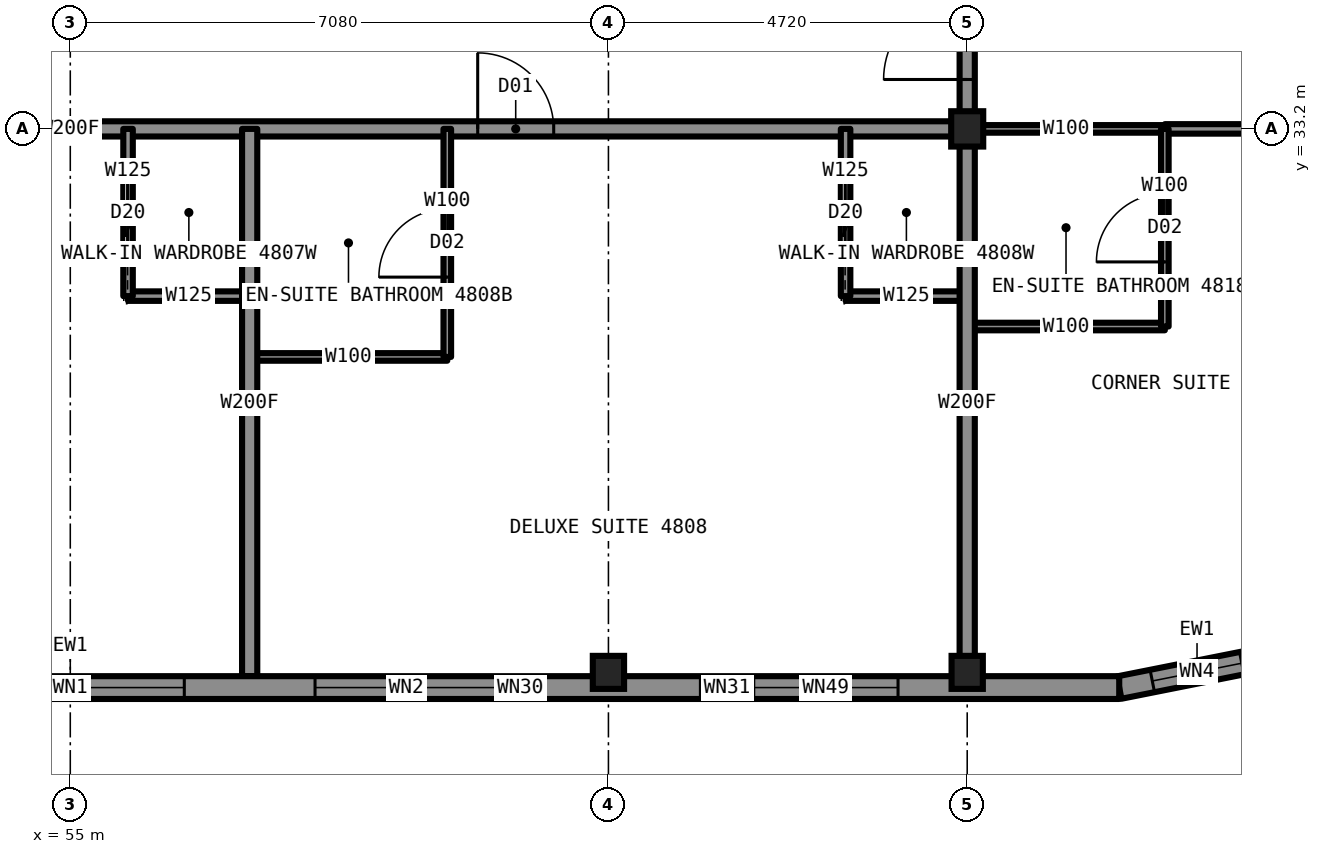
"""IFC4 building model, lengths in metres.
Left out: names, types, materials, properties, quantities, classifications, styles, units other than length and angle.
Written with IfcOpenShell. Run it as: python <this file> out.ifc"""

import sys

from ifc_helpers import new_model, si_unit, direction, frame, frame_2d, origin, origin_2d, place, context, subcontext, project, spatial, rectangle, i_section, extrude, element, fill, save


model = new_model("IFC4")
c1 = context("Model", 3, precision=1e-05, world=origin(), true_north=direction((0.0, 1.0)))
c2 = subcontext(c1, "Body", "Model", "MODEL_VIEW")
j1 = project(units=[si_unit("LENGTHUNIT", "METRE"), si_unit("PLANEANGLEUNIT", "RADIAN")], contexts=[c1])
p1 = place(None, origin())
s1 = spatial("IfcSite", under=j1, at=p1, CompositionType="ELEMENT")
p2 = place(p1, origin())
s2 = spatial("IfcBuilding", under=s1, at=p2, CompositionType="ELEMENT")
p3 = place(p2, frame((0.0, 0.0, 172.3)))
s3 = spatial("IfcBuildingStorey", under=s2, at=p3, CompositionType="ELEMENT", Elevation=172.3)
for number, where, z_axis, x_axis in (
    (1, (62.08, 26.05, 0.0), (0.0, 0.0, 1.0), (1.0, 0.0, 0.0)),
    (2, (66.8, 26.05, 0.0), (0.0, 0.0, 1.0), (1.0, 0.0, 0.0)),
):
    element("IfcColumn", number, at=place(p3, frame(where, z_axis=z_axis, x_axis=x_axis)), inside=s3, PredefinedType="COLUMN", context=c2, shape_type="SweptSolid", body=[
        extrude(i_section(OverallWidth=0.411, OverallDepth=0.434, WebThickness=0.036, FlangeThickness=0.057, at=origin_2d()), origin(), (0.0, 0.0, 1.0), 3.5),
    ])
p4 = place(p3, frame((66.8, 33.2, 0.0), z_axis=(0.0, 0.0, 1.0), x_axis=(1.0, 0.0, 0.0)))
e3 = element("IfcColumn", 3, at=p4, inside=s3, PredefinedType="COLUMN", context=c2, shape_type="SweptSolid", body=[
    extrude(i_section(OverallWidth=0.422, OverallDepth=0.465, WebThickness=0.045, FlangeThickness=0.073, at=origin_2d()), origin(), (0.0, 0.0, 1.0), 3.5),
])
p5 = place(p3, frame((66.8, 33.2, 0.0), z_axis=(0.0, 0.0, 1.0), x_axis=(1.0, 0.0, 0.0)))
e4 = element("IfcWall", 4, at=p5, inside=s3, PredefinedType="PARTITIONING", context=c2, shape_type="SweptSolid", body=[
    extrude(rectangle(XDim=2.6, YDim=0.1, at=frame_2d((1.3, 0.0))), origin(), (0.0, 0.0, 1.0), 2.573),
])
p6 = place(p3, frame((43.2, 33.2, 0.0), z_axis=(0.0, 0.0, 1.0), x_axis=(1.0, 0.0, 0.0)))
e5 = element("IfcWall", 5, at=p6, inside=s3, PredefinedType="PARTITIONING", context=c2, shape_type="SweptSolid", body=[
    extrude(rectangle(XDim=23.6, YDim=0.2, at=frame_2d((11.8, 0.0))), origin(), (0.0, 0.0, 1.0), 3.33),
])
p7 = place(p6, frame((1.46, 0.0, 0.0)))
e6 = element("IfcOpeningElement", 6, at=p7, cuts=e5, PredefinedType="OPENING", context=c2, shape_type="SweptSolid", body=[
    extrude(rectangle(XDim=1.0, YDim=2.2, at=frame_2d((0.5, 1.1))), frame((0.0, 0.11, 0.0), z_axis=(0.0, -1.0, 0.0), x_axis=(1.0, 0.0, 0.0)), (0.0, 0.0, 1.0), 0.22),
])
p8 = place(p6, frame((7.72, 0.0, 0.0)))
e7 = element("IfcOpeningElement", 7, at=p8, cuts=e5, PredefinedType="OPENING", context=c2, shape_type="SweptSolid", body=[
    extrude(rectangle(XDim=1.0, YDim=2.2, at=frame_2d((0.5, 1.1))), frame((0.0, 0.11, 0.0), z_axis=(0.0, -1.0, 0.0), x_axis=(1.0, 0.0, 0.0)), (0.0, 0.0, 1.0), 0.22),
])
p9 = place(p6, frame((17.16, 0.0, 0.0)))
e8 = element("IfcOpeningElement", 8, at=p9, cuts=e5, PredefinedType="OPENING", context=c2, shape_type="SweptSolid", body=[
    extrude(rectangle(XDim=1.0, YDim=2.2, at=frame_2d((0.5, 1.1))), frame((0.0, 0.11, 0.0), z_axis=(0.0, -1.0, 0.0), x_axis=(1.0, 0.0, 0.0)), (0.0, 0.0, 1.0), 0.22),
])
p10 = place(p3, frame((69.4, 33.2, 0.0), z_axis=(0.0, 0.0, 1.0), x_axis=(1.0, 0.0, 0.0)))
e9 = element("IfcWall", 9, at=p10, inside=s3, PredefinedType="PARTITIONING", context=c2, shape_type="SweptSolid", body=[
    extrude(rectangle(XDim=4.6, YDim=0.125, at=frame_2d((2.3, 0.0))), origin(), (0.0, 0.0, 1.0), 2.573),
])
p11 = place(p10, frame((1.15, 0.0, 0.0)))
e10 = element("IfcOpeningElement", 10, at=p11, cuts=e9, PredefinedType="OPENING", context=c2, shape_type="SweptSolid", body=[
    extrude(rectangle(XDim=0.9, YDim=2.2, at=frame_2d((0.45, 1.1))), frame((0.0, 0.073, 0.0), z_axis=(0.0, -1.0, 0.0), x_axis=(1.0, 0.0, 0.0)), (0.0, 0.0, 1.0), 0.145),
])
for number, where, z_axis, x_axis in (
    (11, (55.76, 31.0, 0.0), (0.0, 0.0, 1.0), (1.0, 0.0, 0.0)),
    (12, (65.2, 31.0, 0.0), (0.0, 0.0, 1.0), (1.0, 0.0, 0.0)),
):
    element("IfcWall", number, at=place(p3, frame(where, z_axis=z_axis, x_axis=x_axis)), inside=s3, PredefinedType="PARTITIONING", context=c2, shape_type="SweptSolid", body=[
        extrude(rectangle(XDim=1.6, YDim=0.125, at=frame_2d((0.8, 0.0))), origin(), (0.0, 0.0, 1.0), 3.33),
    ])
for number, where, z_axis, x_axis in (
    (13, (66.8, 30.6, 0.0), (0.0, 0.0, 1.0), (1.0, 0.0, 0.0)),
    (14, (57.36, 30.2, 0.0), (0.0, 0.0, 1.0), (1.0, 0.0, 0.0)),
):
    element("IfcWall", number, at=place(p3, frame(where, z_axis=z_axis, x_axis=x_axis)), inside=s3, PredefinedType="PARTITIONING", context=c2, shape_type="SweptSolid", body=[
        extrude(rectangle(XDim=2.6, YDim=0.1, at=frame_2d((1.3, 0.0))), origin(), (0.0, 0.0, 1.0), 3.33),
    ])
p12 = place(p3, frame((55.76, 31.0, 0.0), z_axis=(0.0, 0.0, 1.0), x_axis=(0.0, 1.0, 0.0)))
e15 = element("IfcWall", 15, at=p12, inside=s3, PredefinedType="PARTITIONING", context=c2, shape_type="SweptSolid", body=[
    extrude(rectangle(XDim=2.2, YDim=0.125, at=frame_2d((1.1, 0.0))), origin(), (0.0, 0.0, 1.0), 3.33),
])
p13 = place(p12, frame((0.7, 0.0, 0.0)))
e16 = element("IfcOpeningElement", 16, at=p13, cuts=e15, PredefinedType="OPENING", context=c2, shape_type="SweptSolid", body=[
    extrude(rectangle(XDim=0.8, YDim=2.1, at=frame_2d((0.4, 1.05))), frame((0.0, 0.073, 0.0), z_axis=(0.0, -1.0, 0.0), x_axis=(1.0, 0.0, 0.0)), (0.0, 0.0, 1.0), 0.145),
])
p14 = place(p3, frame((65.2, 31.0, 0.0), z_axis=(0.0, 0.0, 1.0), x_axis=(0.0, 1.0, 0.0)))
e17 = element("IfcWall", 17, at=p14, inside=s3, PredefinedType="PARTITIONING", context=c2, shape_type="SweptSolid", body=[
    extrude(rectangle(XDim=2.2, YDim=0.125, at=frame_2d((1.1, 0.0))), origin(), (0.0, 0.0, 1.0), 3.33),
])
p15 = place(p14, frame((0.7, 0.0, 0.0)))
e18 = element("IfcOpeningElement", 18, at=p15, cuts=e17, PredefinedType="OPENING", context=c2, shape_type="SweptSolid", body=[
    extrude(rectangle(XDim=0.8, YDim=2.1, at=frame_2d((0.4, 1.05))), frame((0.0, 0.073, 0.0), z_axis=(0.0, -1.0, 0.0), x_axis=(1.0, 0.0, 0.0)), (0.0, 0.0, 1.0), 0.145),
])
p16 = place(p3, frame((66.8, 33.2, 0.0), z_axis=(0.0, 0.0, 1.0), x_axis=(0.0, 1.0, 0.0)))
e19 = element("IfcWall", 19, at=p16, inside=s3, PredefinedType="PARTITIONING", context=c2, shape_type="SweptSolid", body=[
    extrude(rectangle(XDim=23.58, YDim=0.2, at=frame_2d((11.79, 0.0))), origin(), (0.0, 0.0, 1.0), 3.33),
])
p17 = place(p16, frame((7.87, 0.0, 0.0)))
e20 = element("IfcOpeningElement", 20, at=p17, cuts=e19, PredefinedType="OPENING", context=c2, shape_type="SweptSolid", body=[
    extrude(rectangle(XDim=1.0, YDim=2.2, at=frame_2d((0.5, 1.1))), frame((0.0, 0.11, 0.0), z_axis=(0.0, -1.0, 0.0), x_axis=(1.0, 0.0, 0.0)), (0.0, 0.0, 1.0), 0.22),
])
p18 = place(p16, frame((10.9, 0.0, 0.0)))
e21 = element("IfcOpeningElement", 21, at=p18, cuts=e19, PredefinedType="OPENING", context=c2, shape_type="SweptSolid", body=[
    extrude(rectangle(XDim=1.0, YDim=2.2, at=frame_2d((0.5, 1.1))), frame((0.0, 0.11, 0.0), z_axis=(0.0, -1.0, 0.0), x_axis=(1.0, 0.0, 0.0)), (0.0, 0.0, 1.0), 0.22),
])
p19 = place(p16, frame((16.42, 0.0, 0.0)))
e22 = element("IfcOpeningElement", 22, at=p19, cuts=e19, PredefinedType="OPENING", context=c2, shape_type="SweptSolid", body=[
    extrude(rectangle(XDim=1.0, YDim=2.2, at=frame_2d((0.5, 1.1))), frame((0.0, 0.11, 0.0), z_axis=(0.0, -1.0, 0.0), x_axis=(1.0, 0.0, 0.0)), (0.0, 0.0, 1.0), 0.22),
])
p20 = place(p16, frame((22.05, 0.0, 0.0)))
e23 = element("IfcOpeningElement", 23, at=p20, cuts=e19, PredefinedType="OPENING", context=c2, shape_type="SweptSolid", body=[
    extrude(rectangle(XDim=1.1, YDim=2.2, at=frame_2d((0.55, 1.1))), frame((0.0, 0.11, 0.0), z_axis=(0.0, -1.0, 0.0), x_axis=(1.0, 0.0, 0.0)), (0.0, 0.0, 1.0), 0.22),
])
p21 = place(p16, frame((0.65, 0.0, 0.0)))
e24 = element("IfcOpeningElement", 24, at=p21, cuts=e19, PredefinedType="OPENING", context=c2, shape_type="SweptSolid", body=[
    extrude(rectangle(XDim=1.1, YDim=2.2, at=frame_2d((0.55, 1.1))), frame((0.0, 0.11, 0.0), z_axis=(0.0, -1.0, 0.0), x_axis=(1.0, 0.0, 0.0)), (0.0, 0.0, 1.0), 0.22),
])
p22 = place(p3, frame((66.8, 26.0, 0.0), z_axis=(0.0, 0.0, 1.0), x_axis=(0.0, 1.0, 0.0)))
e25 = element("IfcWall", 25, at=p22, inside=s3, PredefinedType="PARTITIONING", context=c2, shape_type="SweptSolid", body=[
    extrude(rectangle(XDim=7.2, YDim=0.2, at=frame_2d((3.6, 0.0))), origin(), (0.0, 0.0, 1.0), 2.573),
])
p23 = place(p3, frame((69.4, 30.6, 0.0), z_axis=(0.0, 0.0, 1.0), x_axis=(0.0, 1.0, 0.0)))
e26 = element("IfcWall", 26, at=p23, inside=s3, PredefinedType="PARTITIONING", context=c2, shape_type="SweptSolid", body=[
    extrude(rectangle(XDim=2.6, YDim=0.1, at=frame_2d((1.3, 0.0))), origin(), (0.0, 0.0, 1.0), 3.33),
])
p24 = place(p23, frame((0.85, 0.0, 0.0)))
e27 = element("IfcOpeningElement", 27, at=p24, cuts=e26, PredefinedType="OPENING", context=c2, shape_type="SweptSolid", body=[
    extrude(rectangle(XDim=0.9, YDim=2.1, at=frame_2d((0.45, 1.05))), frame((0.0, 0.06, 0.0), z_axis=(0.0, -1.0, 0.0), x_axis=(1.0, 0.0, 0.0)), (0.0, 0.0, 1.0), 0.12),
])
p25 = place(p3, frame((57.36, 26.0, 0.0), z_axis=(0.0, 0.0, 1.0), x_axis=(0.0, 1.0, 0.0)))
e28 = element("IfcWall", 28, at=p25, inside=s3, PredefinedType="PARTITIONING", context=c2, shape_type="SweptSolid", body=[
    extrude(rectangle(XDim=7.2, YDim=0.2, at=frame_2d((3.6, 0.0))), origin(), (0.0, 0.0, 1.0), 3.33),
])
p26 = place(p3, frame((59.96, 30.2, 0.0), z_axis=(0.0, 0.0, 1.0), x_axis=(0.0, 1.0, 0.0)))
e29 = element("IfcWall", 29, at=p26, inside=s3, PredefinedType="PARTITIONING", context=c2, shape_type="SweptSolid", body=[
    extrude(rectangle(XDim=3.0, YDim=0.1, at=frame_2d((1.5, 0.0))), origin(), (0.0, 0.0, 1.0), 3.33),
])
p27 = place(p26, frame((1.05, 0.0, 0.0)))
e30 = element("IfcOpeningElement", 30, at=p27, cuts=e29, PredefinedType="OPENING", context=c2, shape_type="SweptSolid", body=[
    extrude(rectangle(XDim=0.9, YDim=2.1, at=frame_2d((0.45, 1.05))), frame((0.0, 0.06, 0.0), z_axis=(0.0, -1.0, 0.0), x_axis=(1.0, 0.0, 0.0)), (0.0, 0.0, 1.0), 0.12),
])
p28 = place(p3, frame((68.8, 25.85, 0.0), z_axis=(0.0, 0.0, 1.0), x_axis=(0.980787050784, 0.195081421501, 0.0)))
e31 = element("IfcWall", 31, at=p28, inside=s3, PredefinedType="SOLIDWALL", context=c2, shape_type="SweptSolid", body=[
    extrude(rectangle(XDim=2.087, YDim=0.3, at=frame_2d((1.044, 0.0))), origin(), (0.0, 0.0, 1.0), 3.33),
])
p29 = place(p28, frame((0.444, 0.0, 0.3)))
e32 = element("IfcOpeningElement", 32, at=p29, cuts=e31, PredefinedType="OPENING", context=c2, shape_type="SweptSolid", body=[
    extrude(rectangle(XDim=1.2, YDim=2.0, at=frame_2d((0.6, 1.0))), frame((0.0, 0.16, 0.0), z_axis=(0.0, -1.0, 0.0), x_axis=(1.0, 0.0, 0.0)), (0.0, 0.0, 1.0), 0.32),
])
p30 = place(p3, frame((41.2, 25.85, 0.0), z_axis=(0.0, 0.0, 1.0), x_axis=(1.0, 0.0, 0.0)))
e33 = element("IfcWall", 33, at=p30, inside=s3, PredefinedType="SOLIDWALL", context=c2, shape_type="SweptSolid", body=[
    extrude(rectangle(XDim=27.6, YDim=0.3, at=frame_2d((13.8, 0.0))), origin(), (0.0, 0.0, 1.0), 2.83),
])
p31 = place(p30, frame((3.46, 0.0, 0.3)))
e34 = element("IfcOpeningElement", 34, at=p31, cuts=e33, PredefinedType="OPENING", context=c2, shape_type="SweptSolid", body=[
    extrude(rectangle(XDim=2.4, YDim=2.0, at=frame_2d((1.2, 1.0))), frame((0.0, 0.16, 0.0), z_axis=(0.0, -1.0, 0.0), x_axis=(1.0, 0.0, 0.0)), (0.0, 0.0, 1.0), 0.32),
])
p32 = place(p30, frame((7.58, 0.0, 0.3)))
e35 = element("IfcOpeningElement", 35, at=p32, cuts=e33, PredefinedType="OPENING", context=c2, shape_type="SweptSolid", body=[
    extrude(rectangle(XDim=3.0, YDim=2.0, at=frame_2d((1.5, 1.0))), frame((0.0, 0.16, 0.0), z_axis=(0.0, -1.0, 0.0), x_axis=(1.0, 0.0, 0.0)), (0.0, 0.0, 1.0), 0.32),
])
p33 = place(p30, frame((12.3, 0.0, 0.3)))
e36 = element("IfcOpeningElement", 36, at=p33, cuts=e33, PredefinedType="OPENING", context=c2, shape_type="SweptSolid", body=[
    extrude(rectangle(XDim=3.0, YDim=2.0, at=frame_2d((1.5, 1.0))), frame((0.0, 0.16, 0.0), z_axis=(0.0, -1.0, 0.0), x_axis=(1.0, 0.0, 0.0)), (0.0, 0.0, 1.0), 0.32),
])
p34 = place(p30, frame((17.02, 0.0, 0.3)))
e37 = element("IfcOpeningElement", 37, at=p34, cuts=e33, PredefinedType="OPENING", context=c2, shape_type="SweptSolid", body=[
    extrude(rectangle(XDim=3.0, YDim=2.0, at=frame_2d((1.5, 1.0))), frame((0.0, 0.16, 0.0), z_axis=(0.0, -1.0, 0.0), x_axis=(1.0, 0.0, 0.0)), (0.0, 0.0, 1.0), 0.32),
])
p35 = place(p30, frame((21.74, 0.0, 0.3)))
e38 = element("IfcOpeningElement", 38, at=p35, cuts=e33, PredefinedType="OPENING", context=c2, shape_type="SweptSolid", body=[
    extrude(rectangle(XDim=2.4, YDim=2.0, at=frame_2d((1.2, 1.0))), frame((0.0, 0.16, 0.0), z_axis=(0.0, -1.0, 0.0), x_axis=(1.0, 0.0, 0.0)), (0.0, 0.0, 1.0), 0.32),
])
p36 = place(p30, frame((2.86, 0.0, 0.3)))
e39 = element("IfcOpeningElement", 39, at=p36, cuts=e33, PredefinedType="OPENING", context=c2, shape_type="SweptSolid", body=[
    extrude(rectangle(XDim=0.6, YDim=1.1, at=frame_2d((0.3, 0.55))), frame((0.0, 0.16, 0.0), z_axis=(0.0, -1.0, 0.0), x_axis=(1.0, 0.0, 0.0)), (0.0, 0.0, 1.0), 0.32),
])
p37 = place(p30, frame((24.14, 0.0, 0.3)))
e40 = element("IfcOpeningElement", 40, at=p37, cuts=e33, PredefinedType="OPENING", context=c2, shape_type="SweptSolid", body=[
    extrude(rectangle(XDim=0.6, YDim=1.1, at=frame_2d((0.3, 0.55))), frame((0.0, 0.16, 0.0), z_axis=(0.0, -1.0, 0.0), x_axis=(1.0, 0.0, 0.0)), (0.0, 0.0, 1.0), 0.32),
])
p38 = place(p13, origin())
e41 = element("IfcDoor", 41, at=p38, inside=s3, OperationType="SLIDING_TO_LEFT", PredefinedType="DOOR", context=c2, shape_type="SweptSolid", body=[
    extrude(rectangle(XDim=0.8, YDim=2.1, at=frame_2d((0.4, 1.05))), frame((0.0, 0.025, 0.0), z_axis=(0.0, -1.0, 0.0), x_axis=(1.0, 0.0, 0.0)), (0.0, 0.0, 1.0), 0.05),
])
fill(e16, e41)
p39 = place(p9, origin())
e42 = element("IfcDoor", 42, at=p39, inside=s3, OperationType="SINGLE_SWING_LEFT", PredefinedType="DOOR", context=c2, shape_type="SweptSolid", body=[
    extrude(rectangle(XDim=1.0, YDim=2.2, at=frame_2d((0.5, 1.1))), frame((0.0, 0.025, 0.0), z_axis=(0.0, -1.0, 0.0), x_axis=(1.0, 0.0, 0.0)), (0.0, 0.0, 1.0), 0.05),
])
fill(e8, e42)
p40 = place(p27, origin())
e43 = element("IfcDoor", 43, at=p40, inside=s3, OperationType="SINGLE_SWING_RIGHT", PredefinedType="DOOR", context=c2, shape_type="SweptSolid", body=[
    extrude(rectangle(XDim=0.9, YDim=2.1, at=frame_2d((0.45, 1.05))), frame((0.0, 0.025, 0.0), z_axis=(0.0, -1.0, 0.0), x_axis=(1.0, 0.0, 0.0)), (0.0, 0.0, 1.0), 0.05),
])
fill(e30, e43)
p41 = place(p15, origin())
e44 = element("IfcDoor", 44, at=p41, inside=s3, OperationType="SLIDING_TO_LEFT", PredefinedType="DOOR", context=c2, shape_type="SweptSolid", body=[
    extrude(rectangle(XDim=0.8, YDim=2.1, at=frame_2d((0.4, 1.05))), frame((0.0, 0.025, 0.0), z_axis=(0.0, -1.0, 0.0), x_axis=(1.0, 0.0, 0.0)), (0.0, 0.0, 1.0), 0.05),
])
fill(e18, e44)
p42 = place(p21, origin())
e45 = element("IfcDoor", 45, at=p42, inside=s3, OperationType="SINGLE_SWING_LEFT", PredefinedType="DOOR", context=c2, shape_type="SweptSolid", body=[
    extrude(rectangle(XDim=1.1, YDim=2.2, at=frame_2d((0.55, 1.1))), frame((0.0, 0.025, 0.0), z_axis=(0.0, -1.0, 0.0), x_axis=(1.0, 0.0, 0.0)), (0.0, 0.0, 1.0), 0.05),
])
fill(e24, e45)
p43 = place(p24, origin())
e46 = element("IfcDoor", 46, at=p43, inside=s3, OperationType="SINGLE_SWING_RIGHT", PredefinedType="DOOR", context=c2, shape_type="SweptSolid", body=[
    extrude(rectangle(XDim=0.9, YDim=2.1, at=frame_2d((0.45, 1.05))), frame((0.0, 0.025, 0.0), z_axis=(0.0, -1.0, 0.0), x_axis=(1.0, 0.0, 0.0)), (0.0, 0.0, 1.0), 0.05),
])
fill(e27, e46)
p44 = place(p29, origin())
e47 = element("IfcWindow", 47, at=p44, inside=s3, PartitioningType="SINGLE_PANEL", PredefinedType="WINDOW", context=c2, shape_type="SweptSolid", body=[
    extrude(rectangle(XDim=1.2, YDim=2.0, at=frame_2d((0.6, 1.0))), frame((0.0, 0.13, 0.0), z_axis=(0.0, -1.0, 0.0), x_axis=(1.0, 0.0, 0.0)), (0.0, 0.0, 1.0), 0.06),
])
fill(e32, e47)
p45 = place(p33, origin())
e48 = element("IfcWindow", 48, at=p45, inside=s3, PartitioningType="SINGLE_PANEL", PredefinedType="WINDOW", context=c2, shape_type="SweptSolid", body=[
    extrude(rectangle(XDim=3.0, YDim=2.0, at=frame_2d((1.5, 1.0))), frame((0.0, 0.13, 0.0), z_axis=(0.0, -1.0, 0.0), x_axis=(1.0, 0.0, 0.0)), (0.0, 0.0, 1.0), 0.06),
])
fill(e36, e48)
p46 = place(p34, origin())
e49 = element("IfcWindow", 49, at=p46, inside=s3, PartitioningType="SINGLE_PANEL", PredefinedType="WINDOW", context=c2, shape_type="SweptSolid", body=[
    extrude(rectangle(XDim=3.0, YDim=2.0, at=frame_2d((1.5, 1.0))), frame((0.0, 0.13, 0.0), z_axis=(0.0, -1.0, 0.0), x_axis=(1.0, 0.0, 0.0)), (0.0, 0.0, 1.0), 0.06),
])
fill(e37, e49)
p47 = place(p35, origin())
e50 = element("IfcWindow", 50, at=p47, inside=s3, PartitioningType="SINGLE_PANEL", PredefinedType="WINDOW", context=c2, shape_type="SweptSolid", body=[
    extrude(rectangle(XDim=2.4, YDim=2.0, at=frame_2d((1.2, 1.0))), frame((0.0, 0.13, 0.0), z_axis=(0.0, -1.0, 0.0), x_axis=(1.0, 0.0, 0.0)), (0.0, 0.0, 1.0), 0.06),
])
fill(e38, e50)
p48 = place(p37, origin())
e51 = element("IfcWindow", 51, at=p48, inside=s3, PartitioningType="SINGLE_PANEL", PredefinedType="WINDOW", context=c2, shape_type="SweptSolid", body=[
    extrude(rectangle(XDim=0.6, YDim=1.1, at=frame_2d((0.3, 0.55))), frame((0.0, 0.13, 0.0), z_axis=(0.0, -1.0, 0.0), x_axis=(1.0, 0.0, 0.0)), (0.0, 0.0, 1.0), 0.06),
])
fill(e40, e51)
save(model, sys.argv[1])
